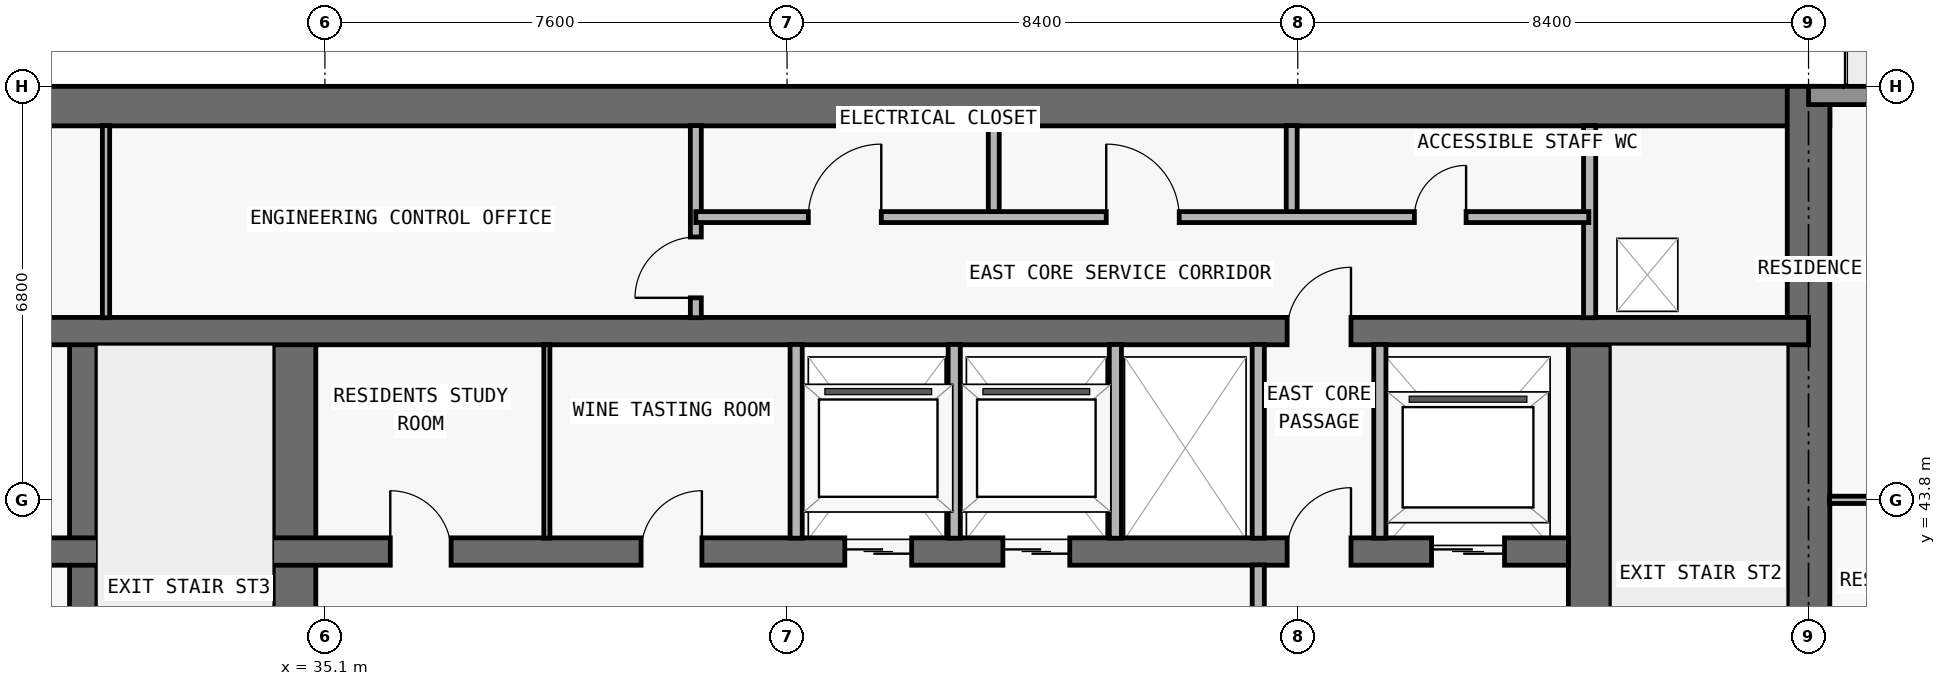
"""IFC4 building model, lengths in metres.
Left out: names, types, materials, properties, quantities, classifications, styles, units other than length and angle.
Written with IfcOpenShell. Run it as: python <this file> out.ifc"""

import sys

from ifc_helpers import new_model, si_unit, direction, frame, frame_2d, origin, place, context, subcontext, project, spatial, rectangle, extrude, element, fill, save


model = new_model("IFC4")
c1 = context("Model", 3, precision=1e-05, world=origin(), true_north=direction((0.0, 1.0)))
c2 = subcontext(c1, "Body", "Model", "MODEL_VIEW")
j1 = project(units=[si_unit("LENGTHUNIT", "METRE"), si_unit("PLANEANGLEUNIT", "RADIAN")], contexts=[c1])
p1 = place(None, origin())
s1 = spatial("IfcSite", under=j1, at=p1, CompositionType="ELEMENT")
p2 = place(p1, origin())
s2 = spatial("IfcBuilding", under=s1, at=p2, CompositionType="ELEMENT")
p3 = place(p2, frame((0.0, 0.0, 160.5)))
s3 = spatial("IfcBuildingStorey", under=s2, at=p3, CompositionType="ELEMENT", Elevation=160.5)
p4 = place(p3, frame((17.95, 50.275, 0.0), z_axis=(0.0, 0.0, 1.0), x_axis=(1.0, 0.0, 0.0)))
e1 = element("IfcWall", 1, at=p4, inside=s3, PredefinedType="SHEAR", context=c2, shape_type="SweptSolid", body=[
    extrude(rectangle(XDim=41.9, YDim=0.65, at=frame_2d((20.95, 0.0))), origin(), (0.0, 0.0, 1.0), 3.05),
])
p5 = place(p3, frame((59.5, 36.65, 0.0), z_axis=(0.0, 0.0, 1.0), x_axis=(0.0, 1.0, 0.0)))
e2 = element("IfcWall", 2, at=p5, inside=s3, PredefinedType="SHEAR", context=c2, shape_type="SweptSolid", body=[
    extrude(rectangle(XDim=13.95, YDim=0.7, at=frame_2d((6.975, 0.0))), origin(), (0.0, 0.0, 1.0), 3.05),
])
p6 = place(p3, frame((55.9, 37.0, 0.0), z_axis=(0.0, 0.0, 1.0), x_axis=(0.0, 1.0, 0.0)))
e3 = element("IfcWall", 3, at=p6, inside=s3, PredefinedType="SHEAR", context=c2, shape_type="SweptSolid", body=[
    extrude(rectangle(XDim=9.575, YDim=0.7, at=frame_2d((4.788, 0.0))), origin(), (0.0, 0.0, 1.0), 3.05),
])
p7 = place(p6, frame((0.55, 0.0, 0.0)))
e4 = element("IfcOpeningElement", 4, at=p7, cuts=e3, PredefinedType="OPENING", context=c2, shape_type="SweptSolid", body=[
    extrude(rectangle(XDim=1.1, YDim=2.15, at=frame_2d((0.55, 1.075))), frame((0.0, 0.36, 0.0), z_axis=(0.0, -1.0, 0.0), x_axis=(1.0, 0.0, 0.0)), (0.0, 0.0, 1.0), 0.72),
])
p8 = place(p3, frame((31.125, 37.0, 0.0), z_axis=(0.0, 0.0, 1.0), x_axis=(0.0, 1.0, 0.0)))
e5 = element("IfcWall", 5, at=p8, inside=s3, PredefinedType="SHEAR", context=c2, shape_type="SweptSolid", body=[
    extrude(rectangle(XDim=9.575, YDim=0.45, at=frame_2d((4.788, 0.0))), origin(), (0.0, 0.0, 1.0), 3.05),
])
p9 = place(p3, frame((34.6, 37.0, 0.0), z_axis=(0.0, 0.0, 1.0), x_axis=(0.0, 1.0, 0.0)))
e6 = element("IfcWall", 6, at=p9, inside=s3, PredefinedType="SHEAR", context=c2, shape_type="SweptSolid", body=[
    extrude(rectangle(XDim=9.575, YDim=0.7, at=frame_2d((4.788, 0.0))), origin(), (0.0, 0.0, 1.0), 3.05),
])
p10 = place(p3, frame((22.25, 42.95, 0.0), z_axis=(0.0, 0.0, 1.0), x_axis=(1.0, 0.0, 0.0)))
e7 = element("IfcWall", 7, at=p10, inside=s3, PredefinedType="SHEAR", context=c2, shape_type="SweptSolid", body=[
    extrude(rectangle(XDim=33.3, YDim=0.45, at=frame_2d((16.65, 0.0))), origin(), (0.0, 0.0, 1.0), 3.05),
])
p11 = place(p10, frame((1.05, 0.0, 0.0)))
e8 = element("IfcOpeningElement", 8, at=p11, cuts=e7, PredefinedType="OPENING", context=c2, shape_type="SweptSolid", body=[
    extrude(rectangle(XDim=1.2, YDim=2.2, at=frame_2d((0.6, 1.1))), frame((0.0, 0.235, 0.0), z_axis=(0.0, -1.0, 0.0), x_axis=(1.0, 0.0, 0.0)), (0.0, 0.0, 1.0), 0.47),
])
p12 = place(p10, frame((31.05, 0.0, 0.0)))
e9 = element("IfcOpeningElement", 9, at=p12, cuts=e7, PredefinedType="OPENING", context=c2, shape_type="SweptSolid", body=[
    extrude(rectangle(XDim=1.2, YDim=2.2, at=frame_2d((0.6, 1.1))), frame((0.0, 0.235, 0.0), z_axis=(0.0, -1.0, 0.0), x_axis=(1.0, 0.0, 0.0)), (0.0, 0.0, 1.0), 0.47),
])
p13 = place(p10, frame((21.4, 0.0, 0.0)))
e10 = element("IfcOpeningElement", 10, at=p13, cuts=e7, PredefinedType="OPENING", context=c2, shape_type="SweptSolid", body=[
    extrude(rectangle(XDim=1.1, YDim=2.2, at=frame_2d((0.55, 1.1))), frame((0.0, 0.235, 0.0), z_axis=(0.0, -1.0, 0.0), x_axis=(1.0, 0.0, 0.0)), (0.0, 0.0, 1.0), 0.47),
])
p14 = place(p10, frame((24.0, 0.0, 0.0)))
e11 = element("IfcOpeningElement", 11, at=p14, cuts=e7, PredefinedType="OPENING", context=c2, shape_type="SweptSolid", body=[
    extrude(rectangle(XDim=1.1, YDim=2.2, at=frame_2d((0.55, 1.1))), frame((0.0, 0.235, 0.0), z_axis=(0.0, -1.0, 0.0), x_axis=(1.0, 0.0, 0.0)), (0.0, 0.0, 1.0), 0.47),
])
p15 = place(p10, frame((3.625, 0.0, 0.0)))
e12 = element("IfcOpeningElement", 12, at=p15, cuts=e7, PredefinedType="OPENING", context=c2, shape_type="SweptSolid", body=[
    extrude(rectangle(XDim=1.05, YDim=2.15, at=frame_2d((0.525, 1.075))), frame((0.0, 0.235, 0.0), z_axis=(0.0, -1.0, 0.0), x_axis=(1.0, 0.0, 0.0)), (0.0, 0.0, 1.0), 0.47),
])
p16 = place(p10, frame((28.675, 0.0, 0.0)))
e13 = element("IfcOpeningElement", 13, at=p16, cuts=e7, PredefinedType="OPENING", context=c2, shape_type="SweptSolid", body=[
    extrude(rectangle(XDim=1.05, YDim=2.15, at=frame_2d((0.525, 1.075))), frame((0.0, 0.235, 0.0), z_axis=(0.0, -1.0, 0.0), x_axis=(1.0, 0.0, 0.0)), (0.0, 0.0, 1.0), 0.47),
])
p17 = place(p10, frame((13.925, 0.0, 0.0)))
e14 = element("IfcOpeningElement", 14, at=p17, cuts=e7, PredefinedType="OPENING", context=c2, shape_type="SweptSolid", body=[
    extrude(rectangle(XDim=1.0, YDim=2.2, at=frame_2d((0.5, 1.1))), frame((0.0, 0.235, 0.0), z_axis=(0.0, -1.0, 0.0), x_axis=(1.0, 0.0, 0.0)), (0.0, 0.0, 1.0), 0.47),
])
p18 = place(p10, frame((18.05, 0.0, 0.0)))
e15 = element("IfcOpeningElement", 15, at=p18, cuts=e7, PredefinedType="OPENING", context=c2, shape_type="SweptSolid", body=[
    extrude(rectangle(XDim=1.0, YDim=2.2, at=frame_2d((0.5, 1.1))), frame((0.0, 0.235, 0.0), z_axis=(0.0, -1.0, 0.0), x_axis=(1.0, 0.0, 0.0)), (0.0, 0.0, 1.0), 0.47),
])
p19 = place(p3, frame((18.3, 46.575, 0.0), z_axis=(0.0, 0.0, 1.0), x_axis=(1.0, 0.0, 0.0)))
e16 = element("IfcWall", 16, at=p19, inside=s3, PredefinedType="SHEAR", context=c2, shape_type="SweptSolid", body=[
    extrude(rectangle(XDim=41.2, YDim=0.45, at=frame_2d((20.6, 0.0))), origin(), (0.0, 0.0, 1.0), 3.05),
])
p20 = place(p19, frame((7.6, 0.0, 0.0)))
e17 = element("IfcOpeningElement", 17, at=p20, cuts=e16, PredefinedType="OPENING", context=c2, shape_type="SweptSolid", body=[
    extrude(rectangle(XDim=1.0, YDim=2.2, at=frame_2d((0.5, 1.1))), frame((0.0, 0.235, 0.0), z_axis=(0.0, -1.0, 0.0), x_axis=(1.0, 0.0, 0.0)), (0.0, 0.0, 1.0), 0.47),
])
p21 = place(p19, frame((32.625, 0.0, 0.0)))
e18 = element("IfcOpeningElement", 18, at=p21, cuts=e16, PredefinedType="OPENING", context=c2, shape_type="SweptSolid", body=[
    extrude(rectangle(XDim=1.05, YDim=2.15, at=frame_2d((0.525, 1.075))), frame((0.0, 0.235, 0.0), z_axis=(0.0, -1.0, 0.0), x_axis=(1.0, 0.0, 0.0)), (0.0, 0.0, 1.0), 0.47),
])
p22 = place(p3, frame((59.5, 50.45, 0.0), z_axis=(0.0, 0.0, 1.0), x_axis=(1.0, 0.0, 0.0)))
e19 = element("IfcWall", 19, at=p22, inside=s3, PredefinedType="STANDARD", context=c2, shape_type="SweptSolid", body=[
    extrude(rectangle(XDim=8.2, YDim=0.3, at=frame_2d((4.1, 0.0))), origin(), (0.0, 0.0, 1.0), 3.05),
])
p23 = place(p22, frame((3.1, 0.0, 0.0)))
e20 = element("IfcOpeningElement", 20, at=p23, cuts=e19, PredefinedType="OPENING", context=c2, shape_type="SweptSolid", body=[
    extrude(rectangle(XDim=2.0, YDim=2.3, at=frame_2d((1.0, 1.15))), frame((0.0, 0.16, 0.0), z_axis=(0.0, -1.0, 0.0), x_axis=(1.0, 0.0, 0.0)), (0.0, 0.0, 1.0), 0.32),
])
p24 = place(p3, frame((31.5, 46.795, 0.0), z_axis=(0.0, 0.0, 1.0), x_axis=(0.0, 1.0, 0.0)))
e21 = element("IfcWall", 21, at=p24, inside=s3, PredefinedType="PARTITIONING", context=c2, shape_type="SweptSolid", body=[
    extrude(rectangle(XDim=3.16, YDim=0.12, at=frame_2d((1.58, 0.0))), origin(), (0.0, 0.0, 1.0), 3.05),
])
p25 = place(p3, frame((38.75, 43.17, 0.0), z_axis=(0.0, 0.0, 1.0), x_axis=(0.0, 1.0, 0.0)))
e22 = element("IfcWall", 22, at=p25, inside=s3, PredefinedType="MOVABLE", context=c2, shape_type="SweptSolid", body=[
    extrude(rectangle(XDim=3.185, YDim=0.1, at=frame_2d((1.593, 0.0))), origin(), (0.0, 0.0, 1.0), 3.05),
])
p26 = place(p3, frame((41.2, 46.795, 0.0), z_axis=(0.0, 0.0, 1.0), x_axis=(0.0, 1.0, 0.0)))
e23 = element("IfcWall", 23, at=p26, inside=s3, PredefinedType="PARTITIONING", context=c2, shape_type="SweptSolid", body=[
    extrude(rectangle(XDim=3.16, YDim=0.18, at=frame_2d((1.58, 0.0))), origin(), (0.0, 0.0, 1.0), 3.05),
])
p27 = place(p26, frame((0.327, 0.0, 0.0)))
e24 = element("IfcOpeningElement", 24, at=p27, cuts=e23, PredefinedType="OPENING", context=c2, shape_type="SweptSolid", body=[
    extrude(rectangle(XDim=1.0, YDim=2.2, at=frame_2d((0.5, 1.1))), frame((0.0, 0.1, 0.0), z_axis=(0.0, -1.0, 0.0), x_axis=(1.0, 0.0, 0.0)), (0.0, 0.0, 1.0), 0.2),
])
for number, where, z_axis, x_axis in (
    (25, (42.85, 43.17, 0.0), (0.0, 0.0, 1.0), (0.0, 1.0, 0.0)),
    (26, (45.45, 43.17, 0.0), (0.0, 0.0, 1.0), (0.0, 1.0, 0.0)),
):
    element("IfcWall", number, at=place(p3, frame(where, z_axis=z_axis, x_axis=x_axis)), inside=s3, PredefinedType="PARTITIONING", context=c2, shape_type="SweptSolid", body=[
        extrude(rectangle(XDim=3.185, YDim=0.2, at=frame_2d((1.593, 0.0))), origin(), (0.0, 0.0, 1.0), 3.05),
    ])
p28 = place(p3, frame((46.1, 48.45, 0.0), z_axis=(0.0, 0.0, 1.0), x_axis=(0.0, 1.0, 0.0)))
e27 = element("IfcWall", 27, at=p28, inside=s3, PredefinedType="PARTITIONING", context=c2, shape_type="SweptSolid", body=[
    extrude(rectangle(XDim=1.505, YDim=0.18, at=frame_2d((0.752, 0.0))), origin(), (0.0, 0.0, 1.0), 3.05),
])
p29 = place(p3, frame((48.1, 43.17, 0.0), z_axis=(0.0, 0.0, 1.0), x_axis=(0.0, 1.0, 0.0)))
e28 = element("IfcWall", 28, at=p29, inside=s3, PredefinedType="PARTITIONING", context=c2, shape_type="SweptSolid", body=[
    extrude(rectangle(XDim=3.185, YDim=0.2, at=frame_2d((1.593, 0.0))), origin(), (0.0, 0.0, 1.0), 3.05),
])
p30 = place(p3, frame((50.45, 37.345, 0.0), z_axis=(0.0, 0.0, 1.0), x_axis=(0.0, 1.0, 0.0)))
e29 = element("IfcWall", 29, at=p30, inside=s3, PredefinedType="PARTITIONING", context=c2, shape_type="SweptSolid", body=[
    extrude(rectangle(XDim=5.385, YDim=0.2, at=frame_2d((2.692, 0.0))), origin(), (0.0, 0.0, 1.0), 3.05),
])
p31 = place(p3, frame((50.45, 43.17, 0.0), z_axis=(0.0, 0.0, 1.0), x_axis=(0.0, 1.0, 0.0)))
e30 = element("IfcWall", 30, at=p31, inside=s3, PredefinedType="PARTITIONING", context=c2, shape_type="SweptSolid", body=[
    extrude(rectangle(XDim=3.185, YDim=0.2, at=frame_2d((1.593, 0.0))), origin(), (0.0, 0.0, 1.0), 3.05),
])
p32 = place(p3, frame((51.0, 48.45, 0.0), z_axis=(0.0, 0.0, 1.0), x_axis=(0.0, 1.0, 0.0)))
e31 = element("IfcWall", 31, at=p32, inside=s3, PredefinedType="PARTITIONING", context=c2, shape_type="SweptSolid", body=[
    extrude(rectangle(XDim=1.505, YDim=0.18, at=frame_2d((0.752, 0.0))), origin(), (0.0, 0.0, 1.0), 3.05),
])
p33 = place(p3, frame((52.45, 43.17, 0.0), z_axis=(0.0, 0.0, 1.0), x_axis=(0.0, 1.0, 0.0)))
e32 = element("IfcWall", 32, at=p33, inside=s3, PredefinedType="PARTITIONING", context=c2, shape_type="SweptSolid", body=[
    extrude(rectangle(XDim=3.185, YDim=0.2, at=frame_2d((1.593, 0.0))), origin(), (0.0, 0.0, 1.0), 3.05),
])
p34 = place(p3, frame((55.9, 46.795, 0.0), z_axis=(0.0, 0.0, 1.0), x_axis=(0.0, 1.0, 0.0)))
e33 = element("IfcWall", 33, at=p34, inside=s3, PredefinedType="PARTITIONING", context=c2, shape_type="SweptSolid", body=[
    extrude(rectangle(XDim=3.16, YDim=0.2, at=frame_2d((1.58, 0.0))), origin(), (0.0, 0.0, 1.0), 3.05),
])
p35 = place(p3, frame((59.845, 43.8, 0.0), z_axis=(0.0, 0.0, 1.0), x_axis=(1.0, 0.0, 0.0)))
e34 = element("IfcWall", 34, at=p35, inside=s3, PredefinedType="PARTITIONING", context=c2, shape_type="SweptSolid", body=[
    extrude(rectangle(XDim=11.56, YDim=0.12, at=frame_2d((5.78, 0.0))), origin(), (0.0, 0.0, 1.0), 2.418),
])
p36 = place(p35, frame((3.445, 0.0, 0.0)))
e35 = element("IfcOpeningElement", 35, at=p36, cuts=e34, PredefinedType="OPENING", context=c2, shape_type="SweptSolid", body=[
    extrude(rectangle(XDim=0.9, YDim=2.15, at=frame_2d((0.45, 1.075))), frame((0.0, 0.07, 0.0), z_axis=(0.0, -1.0, 0.0), x_axis=(1.0, 0.0, 0.0)), (0.0, 0.0, 1.0), 0.14),
])
p37 = place(p35, frame((0.752, 0.0, 0.0)))
e36 = element("IfcOpeningElement", 36, at=p37, cuts=e34, PredefinedType="OPENING", context=c2, shape_type="SweptSolid", body=[
    extrude(rectangle(XDim=0.85, YDim=2.1, at=frame_2d((0.425, 1.05))), frame((0.0, 0.07, 0.0), z_axis=(0.0, -1.0, 0.0), x_axis=(1.0, 0.0, 0.0)), (0.0, 0.0, 1.0), 0.14),
])
p38 = place(p3, frame((41.2, 48.45, 0.0), z_axis=(0.0, 0.0, 1.0), x_axis=(1.0, 0.0, 0.0)))
e37 = element("IfcWall", 37, at=p38, inside=s3, PredefinedType="PARTITIONING", context=c2, shape_type="SweptSolid", body=[
    extrude(rectangle(XDim=14.686, YDim=0.18, at=frame_2d((7.343, 0.0))), origin(), (0.0, 0.0, 1.0), 3.05),
])
p39 = place(p38, frame((1.85, 0.0, 0.0)))
e38 = element("IfcOpeningElement", 38, at=p39, cuts=e37, PredefinedType="OPENING", context=c2, shape_type="SweptSolid", body=[
    extrude(rectangle(XDim=1.2, YDim=2.2, at=frame_2d((0.6, 1.1))), frame((0.0, 0.1, 0.0), z_axis=(0.0, -1.0, 0.0), x_axis=(1.0, 0.0, 0.0)), (0.0, 0.0, 1.0), 0.2),
])
p40 = place(p38, frame((6.75, 0.0, 0.0)))
e39 = element("IfcOpeningElement", 39, at=p40, cuts=e37, PredefinedType="OPENING", context=c2, shape_type="SweptSolid", body=[
    extrude(rectangle(XDim=1.2, YDim=2.2, at=frame_2d((0.6, 1.1))), frame((0.0, 0.1, 0.0), z_axis=(0.0, -1.0, 0.0), x_axis=(1.0, 0.0, 0.0)), (0.0, 0.0, 1.0), 0.2),
])
p41 = place(p38, frame((11.818, 0.0, 0.0)))
e40 = element("IfcOpeningElement", 40, at=p41, cuts=e37, PredefinedType="OPENING", context=c2, shape_type="SweptSolid", body=[
    extrude(rectangle(XDim=0.85, YDim=2.1, at=frame_2d((0.425, 1.05))), frame((0.0, 0.1, 0.0), z_axis=(0.0, -1.0, 0.0), x_axis=(1.0, 0.0, 0.0)), (0.0, 0.0, 1.0), 0.2),
])
p42 = place(p12, origin())
e41 = element("IfcDoor", 41, at=p42, inside=s3, OperationType="DOUBLE_DOOR_SLIDING", PredefinedType="DOOR", context=c2, shape_type="SweptSolid", body=[
    extrude(rectangle(XDim=1.2, YDim=2.2, at=frame_2d((0.6, 1.1))), frame((0.0, 0.025, 0.0), z_axis=(0.0, -1.0, 0.0), x_axis=(1.0, 0.0, 0.0)), (0.0, 0.0, 1.0), 0.05),
])
fill(e9, e41)
p43 = place(p13, origin())
e42 = element("IfcDoor", 42, at=p43, inside=s3, OperationType="DOUBLE_DOOR_SLIDING", PredefinedType="DOOR", context=c2, shape_type="SweptSolid", body=[
    extrude(rectangle(XDim=1.1, YDim=2.2, at=frame_2d((0.55, 1.1))), frame((0.0, 0.025, 0.0), z_axis=(0.0, -1.0, 0.0), x_axis=(1.0, 0.0, 0.0)), (0.0, 0.0, 1.0), 0.05),
])
fill(e10, e42)
p44 = place(p14, origin())
e43 = element("IfcDoor", 43, at=p44, inside=s3, OperationType="DOUBLE_DOOR_SLIDING", PredefinedType="DOOR", context=c2, shape_type="SweptSolid", body=[
    extrude(rectangle(XDim=1.1, YDim=2.2, at=frame_2d((0.55, 1.1))), frame((0.0, 0.025, 0.0), z_axis=(0.0, -1.0, 0.0), x_axis=(1.0, 0.0, 0.0)), (0.0, 0.0, 1.0), 0.05),
])
fill(e11, e43)
p45 = place(p16, origin())
e44 = element("IfcDoor", 44, at=p45, inside=s3, OperationType="SINGLE_SWING_RIGHT", PredefinedType="DOOR", context=c2, shape_type="SweptSolid", body=[
    extrude(rectangle(XDim=1.05, YDim=2.15, at=frame_2d((0.525, 1.075))), frame((0.0, 0.025, 0.0), z_axis=(0.0, -1.0, 0.0), x_axis=(1.0, 0.0, 0.0)), (0.0, 0.0, 1.0), 0.05),
])
fill(e13, e44)
p46 = place(p17, origin())
e45 = element("IfcDoor", 45, at=p46, inside=s3, OperationType="SINGLE_SWING_LEFT", PredefinedType="DOOR", context=c2, shape_type="SweptSolid", body=[
    extrude(rectangle(XDim=1.0, YDim=2.2, at=frame_2d((0.5, 1.1))), frame((0.0, 0.025, 0.0), z_axis=(0.0, -1.0, 0.0), x_axis=(1.0, 0.0, 0.0)), (0.0, 0.0, 1.0), 0.05),
])
fill(e14, e45)
p47 = place(p18, origin())
e46 = element("IfcDoor", 46, at=p47, inside=s3, OperationType="SINGLE_SWING_RIGHT", PredefinedType="DOOR", context=c2, shape_type="SweptSolid", body=[
    extrude(rectangle(XDim=1.0, YDim=2.2, at=frame_2d((0.5, 1.1))), frame((0.0, 0.025, 0.0), z_axis=(0.0, -1.0, 0.0), x_axis=(1.0, 0.0, 0.0)), (0.0, 0.0, 1.0), 0.05),
])
fill(e15, e46)
p48 = place(p21, origin())
e47 = element("IfcDoor", 47, at=p48, inside=s3, OperationType="SINGLE_SWING_RIGHT", PredefinedType="DOOR", context=c2, shape_type="SweptSolid", body=[
    extrude(rectangle(XDim=1.05, YDim=2.15, at=frame_2d((0.525, 1.075))), frame((0.0, 0.025, 0.0), z_axis=(0.0, -1.0, 0.0), x_axis=(1.0, 0.0, 0.0)), (0.0, 0.0, 1.0), 0.05),
])
fill(e18, e47)
p49 = place(p27, origin())
e48 = element("IfcDoor", 48, at=p49, inside=s3, OperationType="SINGLE_SWING_LEFT", PredefinedType="DOOR", context=c2, shape_type="SweptSolid", body=[
    extrude(rectangle(XDim=1.0, YDim=2.2, at=frame_2d((0.5, 1.1))), frame((0.0, 0.025, 0.0), z_axis=(0.0, -1.0, 0.0), x_axis=(1.0, 0.0, 0.0)), (0.0, 0.0, 1.0), 0.05),
])
fill(e24, e48)
p50 = place(p39, origin())
e49 = element("IfcDoor", 49, at=p50, inside=s3, OperationType="SINGLE_SWING_RIGHT", PredefinedType="DOOR", context=c2, shape_type="SweptSolid", body=[
    extrude(rectangle(XDim=1.2, YDim=2.2, at=frame_2d((0.6, 1.1))), frame((0.0, 0.025, 0.0), z_axis=(0.0, -1.0, 0.0), x_axis=(1.0, 0.0, 0.0)), (0.0, 0.0, 1.0), 0.05),
])
fill(e38, e49)
p51 = place(p40, origin())
e50 = element("IfcDoor", 50, at=p51, inside=s3, OperationType="SINGLE_SWING_LEFT", PredefinedType="DOOR", context=c2, shape_type="SweptSolid", body=[
    extrude(rectangle(XDim=1.2, YDim=2.2, at=frame_2d((0.6, 1.1))), frame((0.0, 0.025, 0.0), z_axis=(0.0, -1.0, 0.0), x_axis=(1.0, 0.0, 0.0)), (0.0, 0.0, 1.0), 0.05),
])
fill(e39, e50)
p52 = place(p41, origin())
e51 = element("IfcDoor", 51, at=p52, inside=s3, OperationType="SINGLE_SWING_RIGHT", PredefinedType="DOOR", context=c2, shape_type="SweptSolid", body=[
    extrude(rectangle(XDim=0.85, YDim=2.1, at=frame_2d((0.425, 1.05))), frame((0.0, 0.025, 0.0), z_axis=(0.0, -1.0, 0.0), x_axis=(1.0, 0.0, 0.0)), (0.0, 0.0, 1.0), 0.05),
])
fill(e40, e51)
save(model, sys.argv[1])
